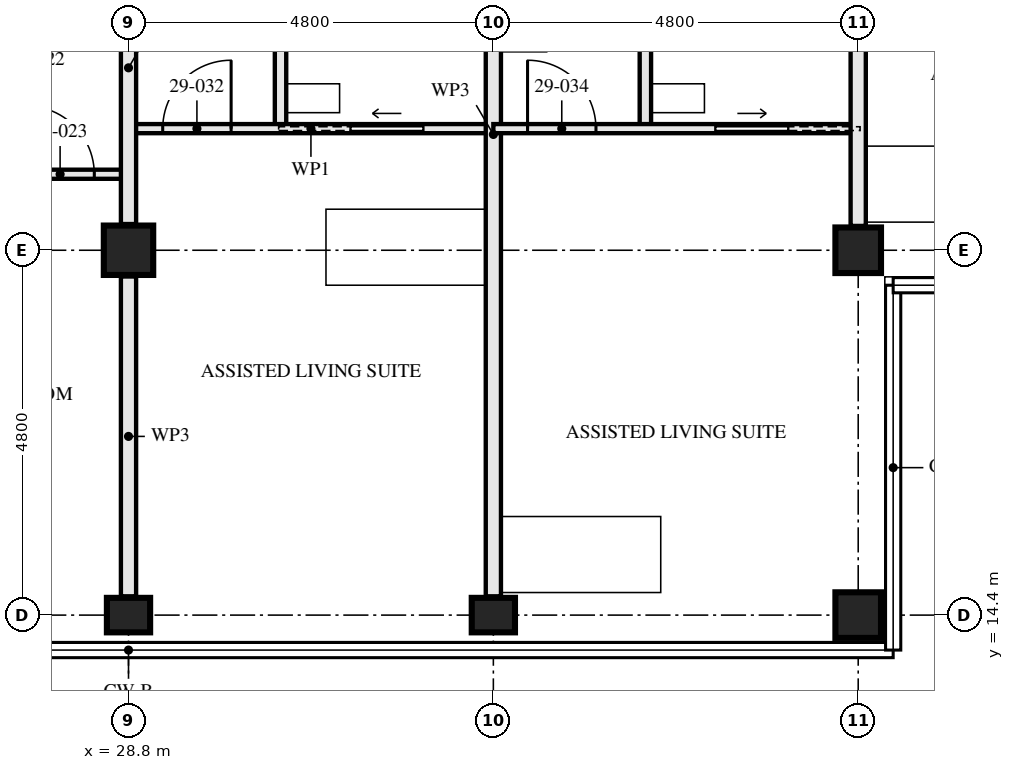
"""IFC4 building model, lengths in metres.
Left out: names, types, materials, properties, quantities, classifications, styles, units other than length and angle.
Written with IfcOpenShell. Run it as: python <this file> out.ifc"""

import sys

from ifc_helpers import new_model, si_unit, direction, frame, frame_2d, origin, origin_2d, place, context, subcontext, project, spatial, rectangle, hollow_rectangle, i_section, extrude, element, fill, save


model = new_model("IFC4")
c1 = context("Model", 3, precision=1e-05, world=origin(), true_north=direction((0.0, 1.0)))
c2 = subcontext(c1, "Body", "Model", "MODEL_VIEW")
j1 = project(units=[si_unit("LENGTHUNIT", "METRE"), si_unit("PLANEANGLEUNIT", "RADIAN")], contexts=[c1])
p1 = place(None, origin())
s1 = spatial("IfcSite", under=j1, at=p1, CompositionType="ELEMENT")
p2 = place(p1, origin())
s2 = spatial("IfcBuilding", under=s1, at=p2, CompositionType="ELEMENT")
p3 = place(p2, frame((0.0, 0.0, 108.5)))
s3 = spatial("IfcBuildingStorey", under=s2, at=p3, CompositionType="ELEMENT", Elevation=108.5)
p4 = place(p3, frame((28.8, 14.4, 0.0), z_axis=(0.0, 0.0, 1.0), x_axis=(0.0, 1.0, 0.0)))
e1 = element("IfcColumn", 1, at=p4, inside=s3, PredefinedType="COLUMN", context=c2, shape_type="SweptSolid", body=[
    extrude(i_section(OverallWidth=0.454, OverallDepth=0.569, WebThickness=0.078, FlangeThickness=0.125, FilletRadius=0.015, at=origin_2d()), origin(), (0.0, 0.0, 1.0), 3.5),
])
p5 = place(p3, frame((28.8, 19.2, 0.0), z_axis=(0.0, 0.0, 1.0), x_axis=(1.0, 0.0, 0.0)))
e2 = element("IfcColumn", 2, at=p5, inside=s3, PredefinedType="COLUMN", context=c2, shape_type="SweptSolid", body=[
    extrude(hollow_rectangle(XDim=0.65, YDim=0.65, WallThickness=0.05, at=origin_2d()), origin(), (0.0, 0.0, 1.0), 3.5),
])
p6 = place(p3, frame((33.6, 14.4, 0.0), z_axis=(0.0, 0.0, 1.0), x_axis=(0.0, 1.0, 0.0)))
e3 = element("IfcColumn", 3, at=p6, inside=s3, PredefinedType="COLUMN", context=c2, shape_type="SweptSolid", body=[
    extrude(i_section(OverallWidth=0.454, OverallDepth=0.569, WebThickness=0.078, FlangeThickness=0.125, FilletRadius=0.015, at=origin_2d()), origin(), (0.0, 0.0, 1.0), 3.5),
])
for number, where, z_axis, x_axis in (
    (4, (38.4, 14.4, 0.0), (0.0, 0.0, 1.0), (0.0, 1.0, 0.0)),
    (5, (38.4, 19.2, 0.0), (0.0, 0.0, 1.0), (0.0, 1.0, 0.0)),
):
    element("IfcColumn", number, at=place(p3, frame(where, z_axis=z_axis, x_axis=x_axis)), inside=s3, PredefinedType="COLUMN", context=c2, shape_type="SweptSolid", body=[
        extrude(hollow_rectangle(XDim=0.6, YDim=0.6, WallThickness=0.05, at=origin_2d()), origin(), (0.0, 0.0, 1.0), 3.5),
    ])
p7 = place(p3, frame((24.0, 20.2, 0.0), z_axis=(0.0, 0.0, 1.0), x_axis=(1.0, 0.0, 0.0)))
e6 = element("IfcWall", 6, at=p7, inside=s3, PredefinedType="PARTITIONING", context=c2, shape_type="SweptSolid", body=[
    extrude(rectangle(XDim=4.8, YDim=0.12, at=frame_2d((2.4, 0.0))), origin(), (0.0, 0.0, 1.0), 3.33),
])
p8 = place(p7, frame((3.45, 0.0, 0.0)))
e7 = element("IfcOpeningElement", 7, at=p8, cuts=e6, PredefinedType="OPENING", context=c2, shape_type="SweptSolid", body=[
    extrude(rectangle(XDim=0.9, YDim=2.1, at=frame_2d((0.45, 1.05))), frame((0.0, 0.071, 0.0), z_axis=(0.0, -1.0, 0.0), x_axis=(1.0, 0.0, 0.0)), (0.0, 0.0, 1.0), 0.141),
])
p9 = place(p3, frame((30.8, 20.8, 0.0), z_axis=(0.0, 0.0, 1.0), x_axis=(0.0, 1.0, 0.0)))
e8 = element("IfcWall", 8, at=p9, inside=s3, PredefinedType="PARTITIONING", context=c2, shape_type="SweptSolid", body=[
    extrude(rectangle(XDim=3.0, YDim=0.15, at=frame_2d((1.5, 0.0))), origin(), (0.0, 0.0, 1.0), 3.33),
])
p10 = place(p3, frame((28.8, 20.8, 0.0), z_axis=(0.0, 0.0, 1.0), x_axis=(1.0, 0.0, 0.0)))
e9 = element("IfcWall", 9, at=p10, inside=s3, PredefinedType="PARTITIONING", context=c2, shape_type="SweptSolid", body=[
    extrude(rectangle(XDim=4.8, YDim=0.12, at=frame_2d((2.4, 0.0))), origin(), (0.0, 0.0, 1.0), 3.33),
])
p11 = place(p10, frame((0.45, 0.0, 0.0)))
e10 = element("IfcOpeningElement", 10, at=p11, cuts=e9, PredefinedType="OPENING", context=c2, shape_type="SweptSolid", body=[
    extrude(rectangle(XDim=0.9, YDim=2.1, at=frame_2d((0.45, 1.05))), frame((0.0, 0.071, 0.0), z_axis=(0.0, -1.0, 0.0), x_axis=(1.0, 0.0, 0.0)), (0.0, 0.0, 1.0), 0.141),
])
p12 = place(p10, frame((2.925, 0.0, 0.0)))
e11 = element("IfcOpeningElement", 11, at=p12, cuts=e9, PredefinedType="OPENING", context=c2, shape_type="SweptSolid", body=[
    extrude(rectangle(XDim=0.95, YDim=2.1, at=frame_2d((0.475, 1.05))), frame((0.0, 0.071, 0.0), z_axis=(0.0, -1.0, 0.0), x_axis=(1.0, 0.0, 0.0)), (0.0, 0.0, 1.0), 0.141),
])
p13 = place(p3, frame((33.6, 14.647, 0.0), z_axis=(0.0, 0.0, 1.0), x_axis=(0.0, 1.0, 0.0)))
e12 = element("IfcWall", 12, at=p13, inside=s3, PredefinedType="PARTITIONING", context=c2, shape_type="SweptSolid", body=[
    extrude(rectangle(XDim=12.153, YDim=0.2, at=frame_2d((6.077, 0.0))), origin(), (0.0, 0.0, 1.0), 2.55),
])
p14 = place(p3, frame((35.6, 20.8, 0.0), z_axis=(0.0, 0.0, 1.0), x_axis=(0.0, 1.0, 0.0)))
e13 = element("IfcWall", 13, at=p14, inside=s3, PredefinedType="PARTITIONING", context=c2, shape_type="SweptSolid", body=[
    extrude(rectangle(XDim=3.0, YDim=0.15, at=frame_2d((1.5, 0.0))), origin(), (0.0, 0.0, 1.0), 3.33),
])
p15 = place(p3, frame((33.6, 20.8, 0.0), z_axis=(0.0, 0.0, 1.0), x_axis=(1.0, 0.0, 0.0)))
e14 = element("IfcWall", 14, at=p15, inside=s3, PredefinedType="PARTITIONING", context=c2, shape_type="SweptSolid", body=[
    extrude(rectangle(XDim=4.8, YDim=0.12, at=frame_2d((2.4, 0.0))), origin(), (0.0, 0.0, 1.0), 3.33),
])
p16 = place(p15, frame((0.45, 0.0, 0.0)))
e15 = element("IfcOpeningElement", 15, at=p16, cuts=e14, PredefinedType="OPENING", context=c2, shape_type="SweptSolid", body=[
    extrude(rectangle(XDim=0.9, YDim=2.1, at=frame_2d((0.45, 1.05))), frame((0.0, 0.071, 0.0), z_axis=(0.0, -1.0, 0.0), x_axis=(1.0, 0.0, 0.0)), (0.0, 0.0, 1.0), 0.141),
])
p17 = place(p15, frame((2.925, 0.0, 0.0)))
e16 = element("IfcOpeningElement", 16, at=p17, cuts=e14, PredefinedType="OPENING", context=c2, shape_type="SweptSolid", body=[
    extrude(rectangle(XDim=0.95, YDim=2.1, at=frame_2d((0.475, 1.05))), frame((0.0, 0.071, 0.0), z_axis=(0.0, -1.0, 0.0), x_axis=(1.0, 0.0, 0.0)), (0.0, 0.0, 1.0), 0.141),
])
p18 = place(p3, frame((38.4, 19.52, 0.0), z_axis=(0.0, 0.0, 1.0), x_axis=(0.0, 1.0, 0.0)))
e17 = element("IfcWall", 17, at=p18, inside=s3, PredefinedType="PARTITIONING", context=c2, shape_type="SweptSolid", body=[
    extrude(rectangle(XDim=7.28, YDim=0.2, at=frame_2d((3.64, 0.0))), origin(), (0.0, 0.0, 1.0), 2.55),
])
p19 = place(p3, frame((28.8, 14.647, 0.0), z_axis=(0.0, 0.0, 1.0), x_axis=(0.0, 1.0, 0.0)))
e18 = element("IfcWall", 18, at=p19, inside=s3, PredefinedType="PARTITIONING", context=c2, shape_type="SweptSolid", body=[
    extrude(rectangle(XDim=4.208, YDim=0.2, at=frame_2d((2.104, 0.0))), origin(), (0.0, 0.0, 1.0), 2.32),
])
p20 = place(p3, frame((28.8, 19.545, 0.0), z_axis=(0.0, 0.0, 1.0), x_axis=(0.0, 1.0, 0.0)))
e19 = element("IfcWall", 19, at=p20, inside=s3, PredefinedType="PARTITIONING", context=c2, shape_type="SweptSolid", body=[
    extrude(rectangle(XDim=4.11, YDim=0.2, at=frame_2d((2.055, 0.0))), origin(), (0.0, 0.0, 1.0), 2.32),
])
p21 = place(p8, origin())
e20 = element("IfcDoor", 20, at=p21, inside=s3, OperationType="SINGLE_SWING_RIGHT", PredefinedType="DOOR", context=c2, shape_type="SweptSolid", body=[
    extrude(rectangle(XDim=0.9, YDim=2.1, at=frame_2d((0.45, 1.05))), frame((0.0, 0.022, 0.0), z_axis=(0.0, -1.0, 0.0), x_axis=(1.0, 0.0, 0.0)), (0.0, 0.0, 1.0), 0.044),
])
fill(e7, e20)
p22 = place(p11, origin())
e21 = element("IfcDoor", 21, at=p22, inside=s3, OperationType="SINGLE_SWING_LEFT", PredefinedType="DOOR", context=c2, shape_type="SweptSolid", body=[
    extrude(rectangle(XDim=0.9, YDim=2.1, at=frame_2d((0.45, 1.05))), frame((0.0, 0.022, 0.0), z_axis=(0.0, -1.0, 0.0), x_axis=(1.0, 0.0, 0.0)), (0.0, 0.0, 1.0), 0.044),
])
fill(e10, e21)
p23 = place(p12, origin())
e22 = element("IfcDoor", 22, at=p23, inside=s3, OperationType="SLIDING_TO_RIGHT", PredefinedType="DOOR", context=c2, shape_type="SweptSolid", body=[
    extrude(rectangle(XDim=0.95, YDim=2.1, at=frame_2d((0.475, 1.05))), frame((0.0, 0.022, 0.0), z_axis=(0.0, -1.0, 0.0), x_axis=(1.0, 0.0, 0.0)), (0.0, 0.0, 1.0), 0.044),
])
fill(e11, e22)
p24 = place(p16, origin())
e23 = element("IfcDoor", 23, at=p24, inside=s3, OperationType="SINGLE_SWING_RIGHT", PredefinedType="DOOR", context=c2, shape_type="SweptSolid", body=[
    extrude(rectangle(XDim=0.9, YDim=2.1, at=frame_2d((0.45, 1.05))), frame((0.0, 0.022, 0.0), z_axis=(0.0, -1.0, 0.0), x_axis=(1.0, 0.0, 0.0)), (0.0, 0.0, 1.0), 0.044),
])
fill(e15, e23)
p25 = place(p17, origin())
e24 = element("IfcDoor", 24, at=p25, inside=s3, OperationType="SLIDING_TO_LEFT", PredefinedType="DOOR", context=c2, shape_type="SweptSolid", body=[
    extrude(rectangle(XDim=0.95, YDim=2.1, at=frame_2d((0.475, 1.05))), frame((0.0, 0.022, 0.0), z_axis=(0.0, -1.0, 0.0), x_axis=(1.0, 0.0, 0.0)), (0.0, 0.0, 1.0), 0.044),
])
fill(e16, e24)
save(model, sys.argv[1])
